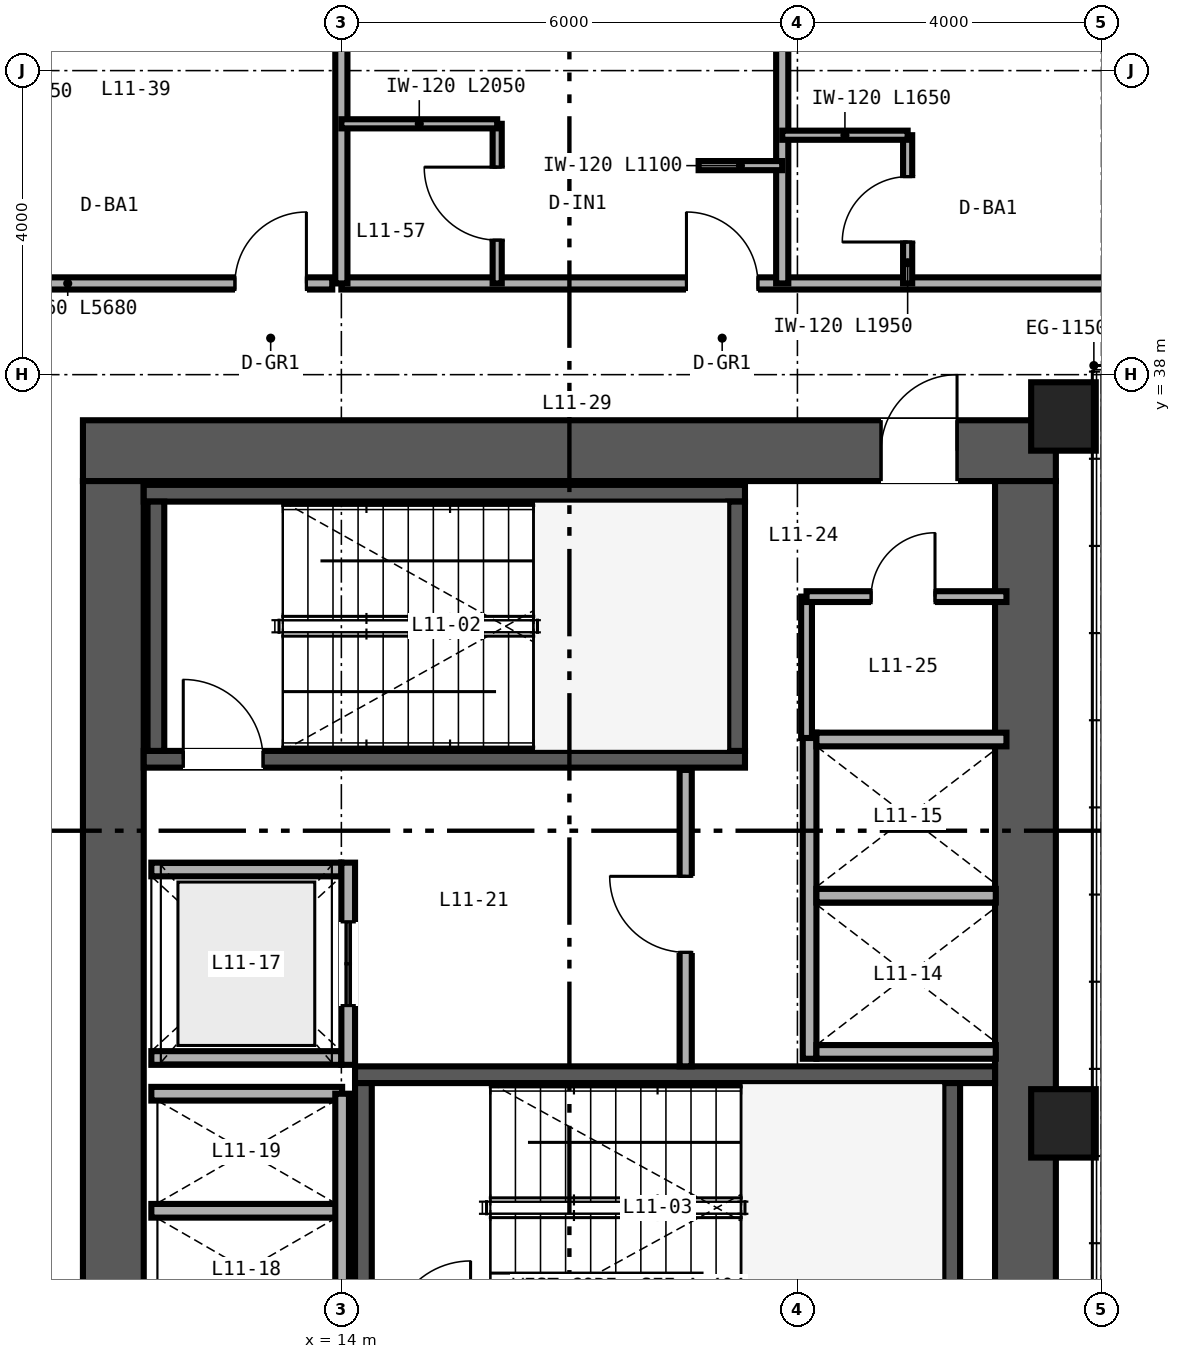
"""IFC4 building model, lengths in metres.
Left out: names, types, materials, properties, quantities, classifications, styles, units other than length and angle.
Written with IfcOpenShell. Run it as: python <this file> out.ifc"""

import sys

from ifc_helpers import new_model, si_unit, direction, frame, frame_2d, origin, origin_2d, place, context, subcontext, project, spatial, rectangle, hollow_rectangle, extrude, source, transform, mapped, element, fill, save


model = new_model("IFC4")
c1 = context("Model", 3, precision=1e-05, world=origin(), true_north=direction((0.0, 1.0)))
c2 = subcontext(c1, "Body", "Model", "MODEL_VIEW")
j1 = project(units=[si_unit("LENGTHUNIT", "METRE"), si_unit("PLANEANGLEUNIT", "RADIAN")], contexts=[c1])
p1 = place(None, origin())
s1 = spatial("IfcSite", under=j1, at=p1, CompositionType="ELEMENT")
p2 = place(p1, origin())
s2 = spatial("IfcBuilding", under=s1, at=p2, CompositionType="ELEMENT")
p3 = place(p2, frame((0.0, 0.0, 49.2)))
s3 = spatial("IfcBuildingStorey", under=s2, at=p3, CompositionType="ELEMENT", Elevation=49.2)
p4 = place(p3, frame((10.6, 37.0, 0.0), z_axis=(0.0, 0.0, 1.0), x_axis=(1.0, 0.0, 0.0)))
e1 = element("IfcWall", 1, at=p4, inside=s3, PredefinedType="SHEAR", context=c2, shape_type="SweptSolid", body=[
    extrude(rectangle(XDim=12.8, YDim=0.8, at=frame_2d((6.4, 0.0))), origin(), (0.0, 0.0, 1.0), 3.35),
])
p5 = place(p4, frame((10.5, 0.0, 0.0)))
e2 = element("IfcOpeningElement", 2, at=p5, cuts=e1, PredefinedType="OPENING", context=c2, shape_type="SweptSolid", body=[
    extrude(rectangle(XDim=1.0, YDim=2.15, at=frame_2d((0.5, 1.075))), frame((0.0, 0.41, 0.0), z_axis=(0.0, -1.0, 0.0), x_axis=(1.0, 0.0, 0.0)), (0.0, 0.0, 1.0), 0.82),
])
for number, where, z_axis, x_axis in (
    (3, (11.0, 15.4, 0.0), (0.0, 0.0, 1.0), (0.0, 1.0, 0.0)),
    (4, (23.0, 15.4, 0.0), (0.0, 0.0, 1.0), (0.0, 1.0, 0.0)),
):
    element("IfcWall", number, at=place(p3, frame(where, z_axis=z_axis, x_axis=x_axis)), inside=s3, PredefinedType="SHEAR", context=c2, shape_type="SweptSolid", body=[
        extrude(rectangle(XDim=21.2, YDim=0.8, at=frame_2d((10.6, 0.0))), origin(), (0.0, 0.0, 1.0), 3.35),
    ])
p6 = place(p3, frame((11.4, 32.94, 0.0), z_axis=(0.0, 0.0, 1.0), x_axis=(1.0, 0.0, 0.0)))
e5 = element("IfcWall", 5, at=p6, inside=s3, PredefinedType="SHEAR", context=c2, shape_type="SweptSolid", body=[
    extrude(rectangle(XDim=7.91, YDim=0.22, at=frame_2d((3.955, 0.0))), origin(), (0.0, 0.0, 1.0), 3.4),
])
p7 = place(p6, frame((0.52, 0.0, 0.0)))
e6 = element("IfcOpeningElement", 6, at=p7, cuts=e5, PredefinedType="OPENING", context=c2, shape_type="SweptSolid", body=[
    extrude(rectangle(XDim=1.05, YDim=2.15, at=frame_2d((0.525, 1.075))), frame((0.0, 0.12, 0.0), z_axis=(0.0, -1.0, 0.0), x_axis=(1.0, 0.0, 0.0)), (0.0, 0.0, 1.0), 0.24),
])
p8 = place(p3, frame((11.4, 36.44, 0.0), z_axis=(0.0, 0.0, 1.0), x_axis=(1.0, 0.0, 0.0)))
e7 = element("IfcWall", 7, at=p8, inside=s3, PredefinedType="SHEAR", context=c2, shape_type="SweptSolid", body=[
    extrude(rectangle(XDim=7.91, YDim=0.22, at=frame_2d((3.955, 0.0))), origin(), (0.0, 0.0, 1.0), 3.4),
])
for number, where, z_axis, x_axis in (
    (8, (11.56, 33.05, 0.0), (0.0, 0.0, 1.0), (0.0, 1.0, 0.0)),
    (9, (19.2, 33.05, 0.0), (0.0, 0.0, 1.0), (0.0, 1.0, 0.0)),
):
    element("IfcWall", number, at=place(p3, frame(where, z_axis=z_axis, x_axis=x_axis)), inside=s3, PredefinedType="SHEAR", context=c2, shape_type="SweptSolid", body=[
        extrude(rectangle(XDim=3.28, YDim=0.22, at=frame_2d((1.64, 0.0))), origin(), (0.0, 0.0, 1.0), 3.4),
    ])
p9 = place(p3, frame((14.18, 28.79, 0.0), z_axis=(0.0, 0.0, 1.0), x_axis=(1.0, 0.0, 0.0)))
e10 = element("IfcWall", 10, at=p9, inside=s3, PredefinedType="SHEAR", context=c2, shape_type="SweptSolid", body=[
    extrude(rectangle(XDim=8.42, YDim=0.22, at=frame_2d((4.21, 0.0))), origin(), (0.0, 0.0, 1.0), 3.4),
])
for number, where, z_axis, x_axis in (
    (11, (14.29, 25.4, 0.0), (0.0, 0.0, 1.0), (0.0, 1.0, 0.0)),
    (12, (22.03, 25.4, 0.0), (0.0, 0.0, 1.0), (0.0, 1.0, 0.0)),
):
    element("IfcWall", number, at=place(p3, frame(where, z_axis=z_axis, x_axis=x_axis)), inside=s3, PredefinedType="SHEAR", context=c2, shape_type="SweptSolid", body=[
        extrude(rectangle(XDim=3.28, YDim=0.22, at=frame_2d((1.64, 0.0))), origin(), (0.0, 0.0, 1.0), 3.4),
    ])
m1 = source(origin(), c2, "Body", "SweptSolid", [
    extrude(hollow_rectangle(XDim=0.85, YDim=0.9, WallThickness=0.04, at=origin_2d()), origin(), (0.0, 0.0, 1.0), 3.35),
])
for number, where, z_axis, x_axis in (
    (13, (23.5, 28.15, 0.0), (0.0, 0.0, 1.0), (1.0, 0.0, 0.0)),
    (14, (23.5, 37.45, 0.0), (0.0, 0.0, 1.0), (1.0, 0.0, 0.0)),
):
    element("IfcColumn", number, at=place(p3, frame(where, z_axis=z_axis, x_axis=x_axis)), inside=s3, PredefinedType="COLUMN", context=c2, shape_type="MappedRepresentation", body=[
        mapped(m1, transform((0.0, 0.0, 0.0), scale=1.0)),
    ])
p10 = place(p3, frame((20.16, 29.0, 0.0), z_axis=(0.0, 0.0, 1.0), x_axis=(0.0, 1.0, 0.0)))
e15 = element("IfcWall", 15, at=p10, inside=s3, PredefinedType="SOLIDWALL", context=c2, shape_type="SweptSolid", body=[
    extrude(rectangle(XDim=4.29, YDim=0.18, at=frame_2d((2.145, 0.0))), origin(), (0.0, 0.0, 1.0), 3.35),
])
p11 = place(p3, frame((20.25, 29.09, 0.0), z_axis=(0.0, 0.0, 1.0), x_axis=(1.0, 0.0, 0.0)))
e16 = element("IfcWall", 16, at=p11, inside=s3, PredefinedType="SOLIDWALL", context=c2, shape_type="SweptSolid", body=[
    extrude(rectangle(XDim=2.36, YDim=0.18, at=frame_2d((1.18, 0.0))), origin(), (0.0, 0.0, 1.0), 3.35),
])
p12 = place(p3, frame((20.25, 33.2, 0.0), z_axis=(0.0, 0.0, 1.0), x_axis=(1.0, 0.0, 0.0)))
e17 = element("IfcWall", 17, at=p12, inside=s3, PredefinedType="SOLIDWALL", context=c2, shape_type="SweptSolid", body=[
    extrude(rectangle(XDim=2.5, YDim=0.18, at=frame_2d((1.25, 0.0))), origin(), (0.0, 0.0, 1.0), 3.35),
])
p13 = place(p3, frame((20.25, 31.145, 0.0), z_axis=(0.0, 0.0, 1.0), x_axis=(1.0, 0.0, 0.0)))
e18 = element("IfcWall", 18, at=p13, inside=s3, PredefinedType="SOLIDWALL", context=c2, shape_type="SweptSolid", body=[
    extrude(rectangle(XDim=2.36, YDim=0.18, at=frame_2d((1.18, 0.0))), origin(), (0.0, 0.0, 1.0), 3.35),
])
for number, where, z_axis, x_axis in (
    (19, (11.5, 29.01, 0.0), (0.0, 0.0, 1.0), (1.0, 0.0, 0.0)),
    (20, (11.5, 31.49, 0.0), (0.0, 0.0, 1.0), (1.0, 0.0, 0.0)),
):
    element("IfcWall", number, at=place(p3, frame(where, z_axis=z_axis, x_axis=x_axis)), inside=s3, PredefinedType="SOLIDWALL", context=c2, shape_type="SweptSolid", body=[
        extrude(rectangle(XDim=2.5, YDim=0.18, at=frame_2d((1.25, 0.0))), origin(), (0.0, 0.0, 1.0), 3.35),
    ])
p14 = place(p3, frame((14.09, 28.92, 0.0), z_axis=(0.0, 0.0, 1.0), x_axis=(0.0, 1.0, 0.0)))
e21 = element("IfcWall", 21, at=p14, inside=s3, PredefinedType="SOLIDWALL", context=c2, shape_type="SweptSolid", body=[
    extrude(rectangle(XDim=2.66, YDim=0.18, at=frame_2d((1.33, 0.0))), origin(), (0.0, 0.0, 1.0), 3.35),
])
p15 = place(p14, frame((0.78, 0.0, 0.0)))
e22 = element("IfcOpeningElement", 22, at=p15, cuts=e21, PredefinedType="OPENING", context=c2, shape_type="SweptSolid", body=[
    extrude(rectangle(XDim=1.1, YDim=2.2, at=frame_2d((0.55, 1.1))), frame((0.0, 0.1, 0.0), z_axis=(0.0, -1.0, 0.0), x_axis=(1.0, 0.0, 0.0)), (0.0, 0.0, 1.0), 0.2),
])
for number, where, z_axis, x_axis in (
    (23, (11.5, 27.0, 0.0), (0.0, 0.0, 1.0), (1.0, 0.0, 0.0)),
    (24, (11.5, 28.54, 0.0), (0.0, 0.0, 1.0), (1.0, 0.0, 0.0)),
):
    element("IfcWall", number, at=place(p3, frame(where, z_axis=z_axis, x_axis=x_axis)), inside=s3, PredefinedType="SOLIDWALL", context=c2, shape_type="SweptSolid", body=[
        extrude(rectangle(XDim=2.51, YDim=0.18, at=frame_2d((1.255, 0.0))), origin(), (0.0, 0.0, 1.0), 3.35),
    ])
p16 = place(p3, frame((14.01, 25.46, 0.0), z_axis=(0.0, 0.0, 1.0), x_axis=(0.0, 1.0, 0.0)))
e25 = element("IfcWall", 25, at=p16, inside=s3, PredefinedType="SOLIDWALL", context=c2, shape_type="SweptSolid", body=[
    extrude(rectangle(XDim=3.08, YDim=0.18, at=frame_2d((1.54, 0.0))), origin(), (0.0, 0.0, 1.0), 3.35),
])
p17 = place(p3, frame((18.53, 28.9, 0.0), z_axis=(0.0, 0.0, 1.0), x_axis=(0.0, 1.0, 0.0)))
e26 = element("IfcWall", 26, at=p17, inside=s3, PredefinedType="PARTITIONING", context=c2, shape_type="SweptSolid", body=[
    extrude(rectangle(XDim=3.9, YDim=0.16, at=frame_2d((1.95, 0.0))), origin(), (0.0, 0.0, 1.0), 3.35),
])
p18 = place(p17, frame((1.5, 0.0, 0.0)))
e27 = element("IfcOpeningElement", 27, at=p18, cuts=e26, PredefinedType="OPENING", context=c2, shape_type="SweptSolid", body=[
    extrude(rectangle(XDim=1.0, YDim=2.15, at=frame_2d((0.5, 1.075))), frame((0.0, 0.09, 0.0), z_axis=(0.0, -1.0, 0.0), x_axis=(1.0, 0.0, 0.0)), (0.0, 0.0, 1.0), 0.18),
])
p19 = place(p3, frame((20.12, 33.22, 0.0), z_axis=(0.0, 0.0, 1.0), x_axis=(0.0, 1.0, 0.0)))
e28 = element("IfcWall", 28, at=p19, inside=s3, PredefinedType="PARTITIONING", context=c2, shape_type="SweptSolid", body=[
    extrude(rectangle(XDim=1.86, YDim=0.142, at=frame_2d((0.93, 0.0))), origin(), (0.0, 0.0, 1.0), 3.35),
])
p20 = place(p3, frame((20.12, 35.08, 0.0), z_axis=(0.0, 0.0, 1.0), x_axis=(1.0, 0.0, 0.0)))
e29 = element("IfcWall", 29, at=p20, inside=s3, PredefinedType="PARTITIONING", context=c2, shape_type="SweptSolid", body=[
    extrude(rectangle(XDim=2.63, YDim=0.142, at=frame_2d((1.315, 0.0))), origin(), (0.0, 0.0, 1.0), 3.35),
])
p21 = place(p20, frame((0.85, 0.0, 0.0)))
e30 = element("IfcOpeningElement", 30, at=p21, cuts=e29, PredefinedType="OPENING", context=c2, shape_type="SweptSolid", body=[
    extrude(rectangle(XDim=0.84, YDim=2.1, at=frame_2d((0.42, 1.05))), frame((0.0, 0.081, 0.0), z_axis=(0.0, -1.0, 0.0), x_axis=(1.0, 0.0, 0.0)), (0.0, 0.0, 1.0), 0.162),
])
p22 = place(p3, frame((8.2, 39.2, 0.0), z_axis=(0.0, 0.0, 1.0), x_axis=(1.0, 0.0, 0.0)))
e31 = element("IfcWall", 31, at=p22, inside=s3, PredefinedType="PARTITIONING", context=c2, shape_type="SweptSolid", body=[
    extrude(rectangle(XDim=5.68, YDim=0.16, at=frame_2d((2.84, 0.0))), origin(), (0.0, 0.0, 1.0), 3.35),
])
p23 = place(p22, frame((4.4, 0.0, 0.0)))
e32 = element("IfcOpeningElement", 32, at=p23, cuts=e31, PredefinedType="OPENING", context=c2, shape_type="SweptSolid", body=[
    extrude(rectangle(XDim=0.94, YDim=2.15, at=frame_2d((0.47, 1.075))), frame((0.0, 0.09, 0.0), z_axis=(0.0, -1.0, 0.0), x_axis=(1.0, 0.0, 0.0)), (0.0, 0.0, 1.0), 0.18),
])
p24 = place(p3, frame((14.0, 39.2, 0.0), z_axis=(0.0, 0.0, 1.0), x_axis=(1.0, 0.0, 0.0)))
e33 = element("IfcWall", 33, at=p24, inside=s3, PredefinedType="PARTITIONING", context=c2, shape_type="SweptSolid", body=[
    extrude(rectangle(XDim=36.0, YDim=0.16, at=frame_2d((18.0, 0.0))), origin(), (0.0, 0.0, 1.0), 2.571),
])
p25 = place(p24, frame((4.54, 0.0, 0.0)))
e34 = element("IfcOpeningElement", 34, at=p25, cuts=e33, PredefinedType="OPENING", context=c2, shape_type="SweptSolid", body=[
    extrude(rectangle(XDim=0.94, YDim=2.15, at=frame_2d((0.47, 1.075))), frame((0.0, 0.09, 0.0), z_axis=(0.0, -1.0, 0.0), x_axis=(1.0, 0.0, 0.0)), (0.0, 0.0, 1.0), 0.18),
])
p26 = place(p24, frame((10.29, 0.0, 0.0)))
e35 = element("IfcOpeningElement", 35, at=p26, cuts=e33, PredefinedType="OPENING", context=c2, shape_type="SweptSolid", body=[
    extrude(rectangle(XDim=0.94, YDim=2.15, at=frame_2d((0.47, 1.075))), frame((0.0, 0.09, 0.0), z_axis=(0.0, -1.0, 0.0), x_axis=(1.0, 0.0, 0.0)), (0.0, 0.0, 1.0), 0.18),
])
p27 = place(p24, frame((16.54, 0.0, 0.0)))
e36 = element("IfcOpeningElement", 36, at=p27, cuts=e33, PredefinedType="OPENING", context=c2, shape_type="SweptSolid", body=[
    extrude(rectangle(XDim=0.94, YDim=2.15, at=frame_2d((0.47, 1.075))), frame((0.0, 0.09, 0.0), z_axis=(0.0, -1.0, 0.0), x_axis=(1.0, 0.0, 0.0)), (0.0, 0.0, 1.0), 0.18),
])
p28 = place(p24, frame((20.62, 0.0, 0.0)))
e37 = element("IfcOpeningElement", 37, at=p28, cuts=e33, PredefinedType="OPENING", context=c2, shape_type="SweptSolid", body=[
    extrude(rectangle(XDim=0.96, YDim=2.15, at=frame_2d((0.48, 1.075))), frame((0.0, 0.09, 0.0), z_axis=(0.0, -1.0, 0.0), x_axis=(1.0, 0.0, 0.0)), (0.0, 0.0, 1.0), 0.18),
])
p29 = place(p24, frame((28.94, 0.0, 0.0)))
e38 = element("IfcOpeningElement", 38, at=p29, cuts=e33, PredefinedType="OPENING", context=c2, shape_type="SweptSolid", body=[
    extrude(rectangle(XDim=0.94, YDim=2.15, at=frame_2d((0.47, 1.075))), frame((0.0, 0.09, 0.0), z_axis=(0.0, -1.0, 0.0), x_axis=(1.0, 0.0, 0.0)), (0.0, 0.0, 1.0), 0.18),
])
p30 = place(p24, frame((34.74, 0.0, 0.0)))
e39 = element("IfcOpeningElement", 39, at=p30, cuts=e33, PredefinedType="OPENING", context=c2, shape_type="SweptSolid", body=[
    extrude(rectangle(XDim=0.94, YDim=2.15, at=frame_2d((0.47, 1.075))), frame((0.0, 0.09, 0.0), z_axis=(0.0, -1.0, 0.0), x_axis=(1.0, 0.0, 0.0)), (0.0, 0.0, 1.0), 0.18),
])
for number, where, z_axis, x_axis in (
    (40, (14.0, 39.2, 0.0), (0.0, 0.0, 1.0), (0.0, 1.0, 0.0)),
    (41, (19.8, 39.2, 0.0), (0.0, 0.0, 1.0), (0.0, 1.0, 0.0)),
):
    element("IfcWall", number, at=place(p3, frame(where, z_axis=z_axis, x_axis=x_axis)), inside=s3, PredefinedType="PARTITIONING", context=c2, shape_type="SweptSolid", body=[
        extrude(rectangle(XDim=10.44, YDim=0.16, at=frame_2d((5.22, 0.0))), origin(), (0.0, 0.0, 1.0), 2.657),
    ])
p31 = place(p3, frame((16.05, 39.2, 0.0), z_axis=(0.0, 0.0, 1.0), x_axis=(0.0, 1.0, 0.0)))
e42 = element("IfcWall", 42, at=p31, inside=s3, PredefinedType="PARTITIONING", context=c2, shape_type="SweptSolid", body=[
    extrude(rectangle(XDim=2.1, YDim=0.12, at=frame_2d((1.05, 0.0))), origin(), (0.0, 0.0, 1.0), 3.35),
])
p32 = place(p31, frame((0.57, 0.0, 0.0)))
e43 = element("IfcOpeningElement", 43, at=p32, cuts=e42, PredefinedType="OPENING", context=c2, shape_type="SweptSolid", body=[
    extrude(rectangle(XDim=0.96, YDim=2.15, at=frame_2d((0.48, 1.075))), frame((0.0, 0.07, 0.0), z_axis=(0.0, -1.0, 0.0), x_axis=(1.0, 0.0, 0.0)), (0.0, 0.0, 1.0), 0.14),
])
p33 = place(p3, frame((14.0, 41.3, 0.0), z_axis=(0.0, 0.0, 1.0), x_axis=(1.0, 0.0, 0.0)))
e44 = element("IfcWall", 44, at=p33, inside=s3, PredefinedType="PARTITIONING", context=c2, shape_type="SweptSolid", body=[
    extrude(rectangle(XDim=2.05, YDim=0.12, at=frame_2d((1.025, 0.0))), origin(), (0.0, 0.0, 1.0), 3.35),
])
p34 = place(p3, frame((18.7, 40.75, 0.0), z_axis=(0.0, 0.0, 1.0), x_axis=(1.0, 0.0, 0.0)))
e45 = element("IfcWall", 45, at=p34, inside=s3, PredefinedType="PARTITIONING", context=c2, shape_type="SweptSolid", body=[
    extrude(rectangle(XDim=1.1, YDim=0.12, at=frame_2d((0.55, 0.0))), origin(), (0.0, 0.0, 1.0), 3.35),
])
p35 = place(p3, frame((21.45, 39.2, 0.0), z_axis=(0.0, 0.0, 1.0), x_axis=(0.0, 1.0, 0.0)))
e46 = element("IfcWall", 46, at=p35, inside=s3, PredefinedType="PARTITIONING", context=c2, shape_type="SweptSolid", body=[
    extrude(rectangle(XDim=1.95, YDim=0.12, at=frame_2d((0.975, 0.0))), origin(), (0.0, 0.0, 1.0), 3.35),
])
p36 = place(p35, frame((0.545, 0.0, 0.0)))
e47 = element("IfcOpeningElement", 47, at=p36, cuts=e46, PredefinedType="OPENING", context=c2, shape_type="SweptSolid", body=[
    extrude(rectangle(XDim=0.86, YDim=2.1, at=frame_2d((0.43, 1.05))), frame((0.0, 0.07, 0.0), z_axis=(0.0, -1.0, 0.0), x_axis=(1.0, 0.0, 0.0)), (0.0, 0.0, 1.0), 0.14),
])
p37 = place(p3, frame((19.8, 41.15, 0.0), z_axis=(0.0, 0.0, 1.0), x_axis=(1.0, 0.0, 0.0)))
e48 = element("IfcWall", 48, at=p37, inside=s3, PredefinedType="PARTITIONING", context=c2, shape_type="SweptSolid", body=[
    extrude(rectangle(XDim=1.65, YDim=0.12, at=frame_2d((0.825, 0.0))), origin(), (0.0, 0.0, 1.0), 3.35),
])
m2 = source(origin(), c2, "Body", "SweptSolid", [
    extrude(rectangle(XDim=1.05, YDim=2.15, at=frame_2d((0.525, 1.075))), frame((0.0, 0.025, 0.0), z_axis=(0.0, -1.0, 0.0), x_axis=(1.0, 0.0, 0.0)), (0.0, 0.0, 1.0), 0.05),
])
p38 = place(p7, origin())
e49 = element("IfcDoor", 49, at=p38, inside=s3, OperationType="SINGLE_SWING_LEFT", PredefinedType="DOOR", context=c2, shape_type="MappedRepresentation", body=[
    mapped(m2, transform((0.0, 0.0, 0.0), scale=1.0)),
])
fill(e6, e49)
m3 = source(origin(), c2, "Body", "SweptSolid", [
    extrude(rectangle(XDim=1.1, YDim=2.2, at=frame_2d((0.55, 1.1))), frame((0.0, 0.025, 0.0), z_axis=(0.0, -1.0, 0.0), x_axis=(1.0, 0.0, 0.0)), (0.0, 0.0, 1.0), 0.05),
])
p39 = place(p15, origin())
e50 = element("IfcDoor", 50, at=p39, inside=s3, OperationType="DOUBLE_DOOR_SLIDING", PredefinedType="DOOR", context=c2, shape_type="MappedRepresentation", body=[
    mapped(m3, transform((0.0, 0.0, 0.0), scale=1.0)),
])
fill(e22, e50)
m4 = source(origin(), c2, "Body", "SweptSolid", [
    extrude(rectangle(XDim=1.0, YDim=2.15, at=frame_2d((0.5, 1.075))), frame((0.0, 0.025, 0.0), z_axis=(0.0, -1.0, 0.0), x_axis=(1.0, 0.0, 0.0)), (0.0, 0.0, 1.0), 0.05),
])
p40 = place(p18, origin())
e51 = element("IfcDoor", 51, at=p40, inside=s3, OperationType="SINGLE_SWING_RIGHT", PredefinedType="DOOR", context=c2, shape_type="MappedRepresentation", body=[
    mapped(m4, transform((0.0, 0.0, 0.0), scale=1.0)),
])
fill(e27, e51)
m5 = source(origin(), c2, "Body", "SweptSolid", [
    extrude(rectangle(XDim=0.84, YDim=2.1, at=frame_2d((0.42, 1.05))), frame((0.0, 0.025, 0.0), z_axis=(0.0, -1.0, 0.0), x_axis=(1.0, 0.0, 0.0)), (0.0, 0.0, 1.0), 0.05),
])
p41 = place(p21, origin())
e52 = element("IfcDoor", 52, at=p41, inside=s3, OperationType="SINGLE_SWING_RIGHT", PredefinedType="DOOR", context=c2, shape_type="MappedRepresentation", body=[
    mapped(m5, transform((0.0, 0.0, 0.0), scale=1.0)),
])
fill(e30, e52)
p42 = place(p5, origin())
e53 = element("IfcDoor", 53, at=p42, inside=s3, OperationType="SINGLE_SWING_RIGHT", PredefinedType="DOOR", context=c2, shape_type="MappedRepresentation", body=[
    mapped(m4, transform((0.0, 0.0, 0.0), scale=1.0)),
])
fill(e2, e53)
m6 = source(origin(), c2, "Body", "SweptSolid", [
    extrude(rectangle(XDim=0.94, YDim=2.15, at=frame_2d((0.47, 1.075))), frame((0.0, 0.025, 0.0), z_axis=(0.0, -1.0, 0.0), x_axis=(1.0, 0.0, 0.0)), (0.0, 0.0, 1.0), 0.05),
])
p43 = place(p23, origin())
e54 = element("IfcDoor", 54, at=p43, inside=s3, OperationType="SINGLE_SWING_RIGHT", PredefinedType="DOOR", context=c2, shape_type="MappedRepresentation", body=[
    mapped(m6, transform((0.0, 0.0, 0.0), scale=1.0)),
])
fill(e32, e54)
m7 = source(origin(), c2, "Body", "SweptSolid", [
    extrude(rectangle(XDim=0.96, YDim=2.15, at=frame_2d((0.48, 1.075))), frame((0.0, 0.025, 0.0), z_axis=(0.0, -1.0, 0.0), x_axis=(1.0, 0.0, 0.0)), (0.0, 0.0, 1.0), 0.05),
])
p44 = place(p32, origin())
e55 = element("IfcDoor", 55, at=p44, inside=s3, OperationType="SINGLE_SWING_RIGHT", PredefinedType="DOOR", context=c2, shape_type="MappedRepresentation", body=[
    mapped(m7, transform((0.0, 0.0, 0.0), scale=1.0)),
])
fill(e43, e55)
m8 = source(origin(), c2, "Body", "SweptSolid", [
    extrude(rectangle(XDim=0.86, YDim=2.1, at=frame_2d((0.43, 1.05))), frame((0.0, 0.025, 0.0), z_axis=(0.0, -1.0, 0.0), x_axis=(1.0, 0.0, 0.0)), (0.0, 0.0, 1.0), 0.05),
])
p45 = place(p36, origin())
e56 = element("IfcDoor", 56, at=p45, inside=s3, OperationType="SINGLE_SWING_LEFT", PredefinedType="DOOR", context=c2, shape_type="MappedRepresentation", body=[
    mapped(m8, transform((0.0, 0.0, 0.0), scale=1.0)),
])
fill(e47, e56)
p46 = place(p25, origin())
e57 = element("IfcDoor", 57, at=p46, inside=s3, OperationType="SINGLE_SWING_LEFT", PredefinedType="DOOR", context=c2, shape_type="MappedRepresentation", body=[
    mapped(m6, transform((0.0, 0.0, 0.0), scale=1.0)),
])
fill(e34, e57)
save(model, sys.argv[1])
